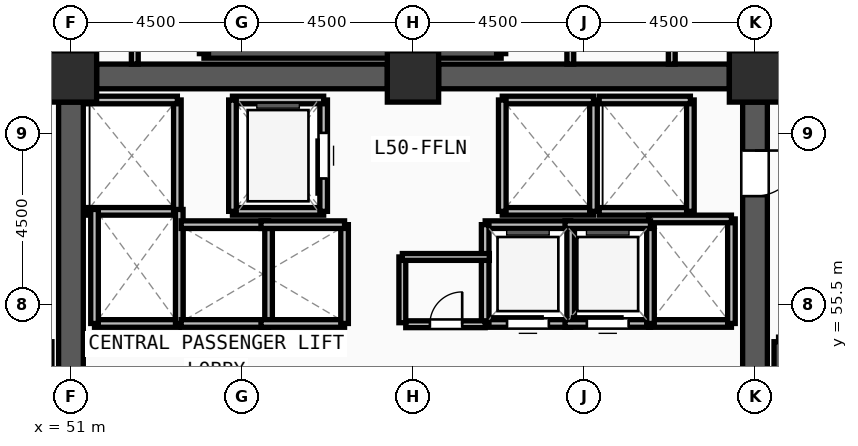
"""IFC4 building model, lengths in metres.
Left out: names, types, materials, properties, quantities, classifications, styles, units other than length and angle.
Written with IfcOpenShell. Run it as: python <this file> out.ifc"""

import sys

from ifc_helpers import new_model, si_unit, direction, frame, frame_2d, origin, origin_2d, place, context, subcontext, project, spatial, rectangle, extrude, source, transform, mapped, element, fill, save


model = new_model("IFC4")
c1 = context("Model", 3, precision=1e-05, world=origin(), true_north=direction((0.0, 1.0)))
c2 = subcontext(c1, "Body", "Model", "MODEL_VIEW")
j1 = project(units=[si_unit("LENGTHUNIT", "METRE"), si_unit("PLANEANGLEUNIT", "RADIAN")], contexts=[c1])
p1 = place(None, origin())
s1 = spatial("IfcSite", under=j1, at=p1, CompositionType="ELEMENT")
p2 = place(p1, origin())
s2 = spatial("IfcBuilding", under=s1, at=p2, CompositionType="ELEMENT")
p3 = place(p2, frame((0.0, 0.0, 194.25)))
s3 = spatial("IfcBuildingStorey", under=s2, at=p3, CompositionType="ELEMENT", Elevation=194.25)
m1 = source(origin(), c2, "Body", "SweptSolid", [
    extrude(rectangle(XDim=1.35, YDim=1.35, at=origin_2d()), origin(), (0.0, 0.0, 1.0), 3.75),
])
for number, where, z_axis, x_axis in (
    (1, (69.0, 61.5, 0.0), (0.0, 0.0, 1.0), (1.0, 0.0, 0.0)),
    (2, (60.0, 61.5, 0.0), (0.0, 0.0, 1.0), (1.0, 0.0, 0.0)),
    (3, (51.0, 61.5, 0.0), (0.0, 0.0, 1.0), (1.0, 0.0, 0.0)),
):
    element("IfcColumn", number, at=place(p3, frame(where, z_axis=z_axis, x_axis=x_axis)), inside=s3, PredefinedType="COLUMN", context=c2, shape_type="MappedRepresentation", body=[
        mapped(m1, transform((0.0, 0.0, 0.0), x_axis=(1.0, 0.0, 0.0), y_axis=(0.0, 1.0, 0.0), z_axis=(0.0, 0.0, 1.0), scale=1.0)),
    ])
for number, where, z_axis, x_axis in (
    (4, (51.675, 61.5, 0.0), (0.0, 0.0, 1.0), (1.0, 0.0, 0.0)),
    (5, (60.675, 61.5, 0.0), (0.0, 0.0, 1.0), (1.0, 0.0, 0.0)),
):
    element("IfcWall", number, at=place(p3, frame(where, z_axis=z_axis, x_axis=x_axis)), inside=s3, PredefinedType="SHEAR", context=c2, shape_type="SweptSolid", body=[
        extrude(rectangle(XDim=7.65, YDim=0.65, at=frame_2d((3.825, 0.0))), origin(), (0.0, 0.0, 1.0), 3.57),
    ])
p4 = place(p3, frame((69.0, 60.825, 0.0), z_axis=(0.0, 0.0, 1.0), x_axis=(0.0, -1.0, 0.0)))
e6 = element("IfcWall", 6, at=p4, inside=s3, PredefinedType="SHEAR", context=c2, shape_type="SweptSolid", body=[
    extrude(rectangle(XDim=13.65, YDim=0.65, at=frame_2d((6.825, 0.0))), origin(), (0.0, 0.0, 1.0), 3.57),
])
m2 = source(origin(), c2, "Body", "SweptSolid", [
    extrude(rectangle(XDim=1.2, YDim=2.2, at=frame_2d((0.6, 1.1))), frame((0.0, 0.335, 0.0), z_axis=(0.0, -1.0, 0.0), x_axis=(1.0, 0.0, 0.0)), (0.0, 0.0, 1.0), 0.67),
])
p5 = place(p4, frame((1.275, 0.0, 0.0)))
e7 = element("IfcOpeningElement", 7, at=p5, cuts=e6, PredefinedType="OPENING", context=c2, shape_type="MappedRepresentation", body=[
    mapped(m2, transform((0.0, 0.0, 0.0), x_axis=(1.0, 0.0, 0.0), y_axis=(0.0, 1.0, 0.0), z_axis=(0.0, 0.0, 1.0), scale=1.0)),
])
p6 = place(p3, frame((51.0, 47.175, 0.0), z_axis=(0.0, 0.0, 1.0), x_axis=(0.0, 1.0, 0.0)))
e8 = element("IfcWall", 8, at=p6, inside=s3, PredefinedType="SHEAR", context=c2, shape_type="SweptSolid", body=[
    extrude(rectangle(XDim=13.65, YDim=0.65, at=frame_2d((6.825, 0.0))), origin(), (0.0, 0.0, 1.0), 3.57),
])
for number, where, z_axis, x_axis in (
    (9, (69.62, 54.52, 0.0), (0.0, 0.0, 1.0), (0.0, -1.0, 0.0)),
    (10, (54.5, 62.1, 0.0), (0.0, 0.0, 1.0), (1.0, 0.0, 0.0)),
):
    element("IfcWall", number, at=place(p3, frame(where, z_axis=z_axis, x_axis=x_axis)), inside=s3, PredefinedType="SOLIDWALL", context=c2, shape_type="SweptSolid", body=[
        extrude(rectangle(XDim=7.82, YDim=0.24, at=frame_2d((3.91, 0.0))), origin(), (0.0, 0.0, 1.0), 3.57),
    ])
for number, where, z_axis, x_axis in (
    (11, (62.32, 62.1, 0.0), (0.0, 0.0, 1.0), (0.0, 1.0, 0.0)),
    (12, (54.5, 65.54, 0.0), (0.0, 0.0, 1.0), (0.0, -1.0, 0.0)),
):
    element("IfcWall", number, at=place(p3, frame(where, z_axis=z_axis, x_axis=x_axis)), inside=s3, PredefinedType="SOLIDWALL", context=c2, shape_type="SweptSolid", body=[
        extrude(rectangle(XDim=3.44, YDim=0.24, at=frame_2d((1.72, 0.0))), origin(), (0.0, 0.0, 1.0), 3.57),
    ])
p7 = place(p3, frame((55.25, 57.95, 0.0), z_axis=(0.0, 0.0, 1.0), x_axis=(1.0, 0.0, 0.0)))
e13 = element("IfcWall", 13, at=p7, inside=s3, PredefinedType="SOLIDWALL", context=c2, shape_type="SweptSolid", body=[
    extrude(rectangle(XDim=2.4, YDim=0.2, at=frame_2d((1.2, 0.0))), origin(), (0.0, 0.0, 1.0), 3.57),
])
p8 = place(p3, frame((57.65, 57.95, 0.0), z_axis=(0.0, 0.0, 1.0), x_axis=(0.0, 1.0, 0.0)))
e14 = element("IfcWall", 14, at=p8, inside=s3, PredefinedType="SOLIDWALL", context=c2, shape_type="SweptSolid", body=[
    extrude(rectangle(XDim=2.93, YDim=0.2, at=frame_2d((1.465, 0.0))), origin(), (0.0, 0.0, 1.0), 3.57),
])
m3 = source(origin(), c2, "Body", "SweptSolid", [
    extrude(rectangle(XDim=1.2, YDim=2.3, at=frame_2d((0.6, 1.15))), frame((0.0, 0.11, 0.0), z_axis=(0.0, -1.0, 0.0), x_axis=(1.0, 0.0, 0.0)), (0.0, 0.0, 1.0), 0.22),
])
p9 = place(p8, frame((0.865, 0.0, 0.0)))
e15 = element("IfcOpeningElement", 15, at=p9, cuts=e14, PredefinedType="OPENING", context=c2, shape_type="MappedRepresentation", body=[
    mapped(m3, transform((0.0, 0.0, 0.0), x_axis=(1.0, 0.0, 0.0), y_axis=(0.0, 1.0, 0.0), z_axis=(0.0, 0.0, 1.0), scale=1.0)),
])
p10 = place(p3, frame((57.65, 60.88, 0.0), z_axis=(0.0, 0.0, 1.0), x_axis=(-1.0, 0.0, 0.0)))
e16 = element("IfcWall", 16, at=p10, inside=s3, PredefinedType="SOLIDWALL", context=c2, shape_type="SweptSolid", body=[
    extrude(rectangle(XDim=2.4, YDim=0.2, at=frame_2d((1.2, 0.0))), origin(), (0.0, 0.0, 1.0), 3.57),
])
p11 = place(p3, frame((55.25, 60.88, 0.0), z_axis=(0.0, 0.0, 1.0), x_axis=(0.0, -1.0, 0.0)))
e17 = element("IfcWall", 17, at=p11, inside=s3, PredefinedType="SOLIDWALL", context=c2, shape_type="SweptSolid", body=[
    extrude(rectangle(XDim=2.93, YDim=0.2, at=frame_2d((1.465, 0.0))), origin(), (0.0, 0.0, 1.0), 3.57),
])
p12 = place(p3, frame((62.35, 57.95, 0.0), z_axis=(0.0, 0.0, 1.0), x_axis=(1.0, 0.0, 0.0)))
e18 = element("IfcWall", 18, at=p12, inside=s3, PredefinedType="SOLIDWALL", context=c2, shape_type="SweptSolid", body=[
    extrude(rectangle(XDim=2.4, YDim=0.2, at=frame_2d((1.2, 0.0))), origin(), (0.0, 0.0, 1.0), 3.57),
])
p13 = place(p3, frame((64.75, 57.95, 0.0), z_axis=(0.0, 0.0, 1.0), x_axis=(0.0, 1.0, 0.0)))
e19 = element("IfcWall", 19, at=p13, inside=s3, PredefinedType="SOLIDWALL", context=c2, shape_type="SweptSolid", body=[
    extrude(rectangle(XDim=2.93, YDim=0.2, at=frame_2d((1.465, 0.0))), origin(), (0.0, 0.0, 1.0), 3.57),
])
p14 = place(p3, frame((64.75, 60.88, 0.0), z_axis=(0.0, 0.0, 1.0), x_axis=(-1.0, 0.0, 0.0)))
e20 = element("IfcWall", 20, at=p14, inside=s3, PredefinedType="SOLIDWALL", context=c2, shape_type="SweptSolid", body=[
    extrude(rectangle(XDim=2.4, YDim=0.2, at=frame_2d((1.2, 0.0))), origin(), (0.0, 0.0, 1.0), 3.57),
])
p15 = place(p3, frame((62.35, 60.88, 0.0), z_axis=(0.0, 0.0, 1.0), x_axis=(0.0, -1.0, 0.0)))
e21 = element("IfcWall", 21, at=p15, inside=s3, PredefinedType="SOLIDWALL", context=c2, shape_type="SweptSolid", body=[
    extrude(rectangle(XDim=2.93, YDim=0.2, at=frame_2d((1.465, 0.0))), origin(), (0.0, 0.0, 1.0), 3.57),
])
p16 = place(p3, frame((64.9, 57.95, 0.0), z_axis=(0.0, 0.0, 1.0), x_axis=(1.0, 0.0, 0.0)))
e22 = element("IfcWall", 22, at=p16, inside=s3, PredefinedType="SOLIDWALL", context=c2, shape_type="SweptSolid", body=[
    extrude(rectangle(XDim=2.4, YDim=0.2, at=frame_2d((1.2, 0.0))), origin(), (0.0, 0.0, 1.0), 3.57),
])
p17 = place(p3, frame((67.3, 57.95, 0.0), z_axis=(0.0, 0.0, 1.0), x_axis=(0.0, 1.0, 0.0)))
e23 = element("IfcWall", 23, at=p17, inside=s3, PredefinedType="SOLIDWALL", context=c2, shape_type="SweptSolid", body=[
    extrude(rectangle(XDim=2.93, YDim=0.2, at=frame_2d((1.465, 0.0))), origin(), (0.0, 0.0, 1.0), 3.57),
])
for number, where, z_axis, x_axis in (
    (24, (67.3, 60.88, 0.0), (0.0, 0.0, 1.0), (-1.0, 0.0, 0.0)),
    (25, (51.4, 57.95, 0.0), (0.0, 0.0, 1.0), (1.0, 0.0, 0.0)),
):
    element("IfcWall", number, at=place(p3, frame(where, z_axis=z_axis, x_axis=x_axis)), inside=s3, PredefinedType="SOLIDWALL", context=c2, shape_type="SweptSolid", body=[
        extrude(rectangle(XDim=2.4, YDim=0.2, at=frame_2d((1.2, 0.0))), origin(), (0.0, 0.0, 1.0), 3.57),
    ])
p18 = place(p3, frame((53.8, 57.95, 0.0), z_axis=(0.0, 0.0, 1.0), x_axis=(0.0, 1.0, 0.0)))
e26 = element("IfcWall", 26, at=p18, inside=s3, PredefinedType="SOLIDWALL", context=c2, shape_type="SweptSolid", body=[
    extrude(rectangle(XDim=2.93, YDim=0.2, at=frame_2d((1.465, 0.0))), origin(), (0.0, 0.0, 1.0), 3.57),
])
p19 = place(p3, frame((53.8, 60.88, 0.0), z_axis=(0.0, 0.0, 1.0), x_axis=(-1.0, 0.0, 0.0)))
e27 = element("IfcWall", 27, at=p19, inside=s3, PredefinedType="SOLIDWALL", context=c2, shape_type="SweptSolid", body=[
    extrude(rectangle(XDim=2.4, YDim=0.2, at=frame_2d((1.2, 0.0))), origin(), (0.0, 0.0, 1.0), 3.57),
])
p20 = place(p3, frame((51.62, 55.0, 0.0), z_axis=(0.0, 0.0, 1.0), x_axis=(1.0, 0.0, 0.0)))
e28 = element("IfcWall", 28, at=p20, inside=s3, PredefinedType="SOLIDWALL", context=c2, shape_type="SweptSolid", body=[
    extrude(rectangle(XDim=2.23, YDim=0.2, at=frame_2d((1.115, 0.0))), origin(), (0.0, 0.0, 1.0), 3.57),
])
for number, where, z_axis, x_axis in (
    (29, (53.85, 55.0, 0.0), (0.0, 0.0, 1.0), (0.0, 1.0, 0.0)),
    (30, (51.62, 58.0, 0.0), (0.0, 0.0, 1.0), (0.0, -1.0, 0.0)),
):
    element("IfcWall", number, at=place(p3, frame(where, z_axis=z_axis, x_axis=x_axis)), inside=s3, PredefinedType="SOLIDWALL", context=c2, shape_type="SweptSolid", body=[
        extrude(rectangle(XDim=3.0, YDim=0.2, at=frame_2d((1.5, 0.0))), origin(), (0.0, 0.0, 1.0), 3.57),
    ])
p21 = place(p3, frame((66.2, 55.0, 0.0), z_axis=(0.0, 0.0, 1.0), x_axis=(1.0, 0.0, 0.0)))
e31 = element("IfcWall", 31, at=p21, inside=s3, PredefinedType="SOLIDWALL", context=c2, shape_type="SweptSolid", body=[
    extrude(rectangle(XDim=2.18, YDim=0.2, at=frame_2d((1.09, 0.0))), origin(), (0.0, 0.0, 1.0), 3.57),
])
p22 = place(p3, frame((68.38, 55.0, 0.0), z_axis=(0.0, 0.0, 1.0), x_axis=(0.0, 1.0, 0.0)))
e32 = element("IfcWall", 32, at=p22, inside=s3, PredefinedType="SOLIDWALL", context=c2, shape_type="SweptSolid", body=[
    extrude(rectangle(XDim=2.75, YDim=0.2, at=frame_2d((1.375, 0.0))), origin(), (0.0, 0.0, 1.0), 3.57),
])
p23 = place(p3, frame((68.38, 57.75, 0.0), z_axis=(0.0, 0.0, 1.0), x_axis=(-1.0, 0.0, 0.0)))
e33 = element("IfcWall", 33, at=p23, inside=s3, PredefinedType="SOLIDWALL", context=c2, shape_type="SweptSolid", body=[
    extrude(rectangle(XDim=2.18, YDim=0.2, at=frame_2d((1.09, 0.0))), origin(), (0.0, 0.0, 1.0), 3.57),
])
p24 = place(p3, frame((53.9, 55.0, 0.0), z_axis=(0.0, 0.0, 1.0), x_axis=(1.0, 0.0, 0.0)))
e34 = element("IfcWall", 34, at=p24, inside=s3, PredefinedType="SOLIDWALL", context=c2, shape_type="SweptSolid", body=[
    extrude(rectangle(XDim=2.3, YDim=0.2, at=frame_2d((1.15, 0.0))), origin(), (0.0, 0.0, 1.0), 3.57),
])
p25 = place(p3, frame((56.2, 55.0, 0.0), z_axis=(0.0, 0.0, 1.0), x_axis=(0.0, 1.0, 0.0)))
e35 = element("IfcWall", 35, at=p25, inside=s3, PredefinedType="SOLIDWALL", context=c2, shape_type="SweptSolid", body=[
    extrude(rectangle(XDim=2.6, YDim=0.2, at=frame_2d((1.3, 0.0))), origin(), (0.0, 0.0, 1.0), 3.57),
])
p26 = place(p3, frame((56.2, 57.6, 0.0), z_axis=(0.0, 0.0, 1.0), x_axis=(-1.0, 0.0, 0.0)))
e36 = element("IfcWall", 36, at=p26, inside=s3, PredefinedType="SOLIDWALL", context=c2, shape_type="SweptSolid", body=[
    extrude(rectangle(XDim=2.3, YDim=0.2, at=frame_2d((1.15, 0.0))), origin(), (0.0, 0.0, 1.0), 3.57),
])
p27 = place(p3, frame((56.0, 55.0, 0.0), z_axis=(0.0, 0.0, 1.0), x_axis=(1.0, 0.0, 0.0)))
e37 = element("IfcWall", 37, at=p27, inside=s3, PredefinedType="SOLIDWALL", context=c2, shape_type="SweptSolid", body=[
    extrude(rectangle(XDim=2.2, YDim=0.2, at=frame_2d((1.1, 0.0))), origin(), (0.0, 0.0, 1.0), 3.57),
])
p28 = place(p3, frame((58.2, 55.0, 0.0), z_axis=(0.0, 0.0, 1.0), x_axis=(0.0, 1.0, 0.0)))
e38 = element("IfcWall", 38, at=p28, inside=s3, PredefinedType="SOLIDWALL", context=c2, shape_type="SweptSolid", body=[
    extrude(rectangle(XDim=2.6, YDim=0.2, at=frame_2d((1.3, 0.0))), origin(), (0.0, 0.0, 1.0), 3.57),
])
p29 = place(p3, frame((58.2, 57.6, 0.0), z_axis=(0.0, 0.0, 1.0), x_axis=(-1.0, 0.0, 0.0)))
e39 = element("IfcWall", 39, at=p29, inside=s3, PredefinedType="SOLIDWALL", context=c2, shape_type="SweptSolid", body=[
    extrude(rectangle(XDim=2.2, YDim=0.2, at=frame_2d((1.1, 0.0))), origin(), (0.0, 0.0, 1.0), 3.57),
])
p30 = place(p3, frame((61.9, 55.0, 0.0), z_axis=(0.0, 0.0, 1.0), x_axis=(1.0, 0.0, 0.0)))
e40 = element("IfcWall", 40, at=p30, inside=s3, PredefinedType="SOLIDWALL", context=c2, shape_type="SweptSolid", body=[
    extrude(rectangle(XDim=2.25, YDim=0.2, at=frame_2d((1.125, 0.0))), origin(), (0.0, 0.0, 1.0), 3.57),
])
m4 = source(origin(), c2, "Body", "SweptSolid", [
    extrude(rectangle(XDim=1.1, YDim=2.2, at=frame_2d((0.55, 1.1))), frame((0.0, 0.11, 0.0), z_axis=(0.0, -1.0, 0.0), x_axis=(1.0, 0.0, 0.0)), (0.0, 0.0, 1.0), 0.22),
])
p31 = place(p30, frame((0.575, 0.0, 0.0)))
e41 = element("IfcOpeningElement", 41, at=p31, cuts=e40, PredefinedType="OPENING", context=c2, shape_type="MappedRepresentation", body=[
    mapped(m4, transform((0.0, 0.0, 0.0), x_axis=(1.0, 0.0, 0.0), y_axis=(0.0, 1.0, 0.0), z_axis=(0.0, 0.0, 1.0), scale=1.0)),
])
p32 = place(p3, frame((64.15, 55.0, 0.0), z_axis=(0.0, 0.0, 1.0), x_axis=(0.0, 1.0, 0.0)))
e42 = element("IfcWall", 42, at=p32, inside=s3, PredefinedType="SOLIDWALL", context=c2, shape_type="SweptSolid", body=[
    extrude(rectangle(XDim=2.6, YDim=0.2, at=frame_2d((1.3, 0.0))), origin(), (0.0, 0.0, 1.0), 3.57),
])
p33 = place(p3, frame((64.15, 57.6, 0.0), z_axis=(0.0, 0.0, 1.0), x_axis=(-1.0, 0.0, 0.0)))
e43 = element("IfcWall", 43, at=p33, inside=s3, PredefinedType="SOLIDWALL", context=c2, shape_type="SweptSolid", body=[
    extrude(rectangle(XDim=2.25, YDim=0.2, at=frame_2d((1.125, 0.0))), origin(), (0.0, 0.0, 1.0), 3.57),
])
p34 = place(p3, frame((61.9, 57.6, 0.0), z_axis=(0.0, 0.0, 1.0), x_axis=(0.0, -1.0, 0.0)))
e44 = element("IfcWall", 44, at=p34, inside=s3, PredefinedType="SOLIDWALL", context=c2, shape_type="SweptSolid", body=[
    extrude(rectangle(XDim=2.6, YDim=0.2, at=frame_2d((1.3, 0.0))), origin(), (0.0, 0.0, 1.0), 3.57),
])
p35 = place(p3, frame((64.0, 55.0, 0.0), z_axis=(0.0, 0.0, 1.0), x_axis=(1.0, 0.0, 0.0)))
e45 = element("IfcWall", 45, at=p35, inside=s3, PredefinedType="SOLIDWALL", context=c2, shape_type="SweptSolid", body=[
    extrude(rectangle(XDim=2.25, YDim=0.2, at=frame_2d((1.125, 0.0))), origin(), (0.0, 0.0, 1.0), 3.57),
])
p36 = place(p35, frame((0.575, 0.0, 0.0)))
e46 = element("IfcOpeningElement", 46, at=p36, cuts=e45, PredefinedType="OPENING", context=c2, shape_type="MappedRepresentation", body=[
    mapped(m4, transform((0.0, 0.0, 0.0), x_axis=(1.0, 0.0, 0.0), y_axis=(0.0, 1.0, 0.0), z_axis=(0.0, 0.0, 1.0), scale=1.0)),
])
p37 = place(p3, frame((66.25, 55.0, 0.0), z_axis=(0.0, 0.0, 1.0), x_axis=(0.0, 1.0, 0.0)))
e47 = element("IfcWall", 47, at=p37, inside=s3, PredefinedType="SOLIDWALL", context=c2, shape_type="SweptSolid", body=[
    extrude(rectangle(XDim=2.6, YDim=0.2, at=frame_2d((1.3, 0.0))), origin(), (0.0, 0.0, 1.0), 3.57),
])
p38 = place(p3, frame((66.25, 57.6, 0.0), z_axis=(0.0, 0.0, 1.0), x_axis=(-1.0, 0.0, 0.0)))
e48 = element("IfcWall", 48, at=p38, inside=s3, PredefinedType="SOLIDWALL", context=c2, shape_type="SweptSolid", body=[
    extrude(rectangle(XDim=2.25, YDim=0.2, at=frame_2d((1.125, 0.0))), origin(), (0.0, 0.0, 1.0), 3.57),
])
p39 = place(p3, frame((59.81, 54.98, 0.0), z_axis=(0.0, 0.0, 1.0), x_axis=(1.0, 0.0, 0.0)))
e49 = element("IfcWall", 49, at=p39, inside=s3, PredefinedType="PARTITIONING", context=c2, shape_type="SweptSolid", body=[
    extrude(rectangle(XDim=2.09, YDim=0.18, at=frame_2d((1.045, 0.0))), origin(), (0.0, 0.0, 1.0), 3.57),
])
m5 = source(origin(), c2, "Body", "SweptSolid", [
    extrude(rectangle(XDim=0.85, YDim=2.1, at=frame_2d((0.425, 1.05))), frame((0.0, 0.1, 0.0), z_axis=(0.0, -1.0, 0.0), x_axis=(1.0, 0.0, 0.0)), (0.0, 0.0, 1.0), 0.2),
])
p40 = place(p39, frame((0.635, 0.0, 0.0)))
e50 = element("IfcOpeningElement", 50, at=p40, cuts=e49, PredefinedType="OPENING", context=c2, shape_type="MappedRepresentation", body=[
    mapped(m5, transform((0.0, 0.0, 0.0), x_axis=(1.0, 0.0, 0.0), y_axis=(0.0, 1.0, 0.0), z_axis=(0.0, 0.0, 1.0), scale=1.0)),
])
p41 = place(p3, frame((59.72, 55.02, 0.0), z_axis=(0.0, 0.0, 1.0), x_axis=(0.0, 1.0, 0.0)))
e51 = element("IfcWall", 51, at=p41, inside=s3, PredefinedType="PARTITIONING", context=c2, shape_type="SweptSolid", body=[
    extrude(rectangle(XDim=1.73, YDim=0.18, at=frame_2d((0.865, 0.0))), origin(), (0.0, 0.0, 1.0), 3.57),
])
p42 = place(p3, frame((59.72, 56.75, 0.0), z_axis=(0.0, 0.0, 1.0), x_axis=(1.0, 0.0, 0.0)))
e52 = element("IfcWall", 52, at=p42, inside=s3, PredefinedType="PARTITIONING", context=c2, shape_type="SweptSolid", body=[
    extrude(rectangle(XDim=2.29, YDim=0.18, at=frame_2d((1.145, 0.0))), origin(), (0.0, 0.0, 1.0), 3.57),
])
p43 = place(p3, frame((50.54, 61.95, 0.0), z_axis=(0.0, 0.0, 1.0), x_axis=(0.0, 1.0, 0.0)))
e53 = element("IfcWall", 53, at=p43, inside=s3, PredefinedType="PARTITIONING", context=c2, shape_type="SweptSolid", body=[
    extrude(rectangle(XDim=3.63, YDim=0.18, at=frame_2d((1.815, 0.0))), origin(), (0.0, 0.0, 1.0), 3.57),
])
for number, where, z_axis, x_axis in (
    (54, (52.68, 61.825, 0.0), (0.0, 0.0, 1.0), (0.0, 1.0, 0.0)),
    (55, (64.14, 61.825, 0.0), (0.0, 0.0, 1.0), (0.0, 1.0, 0.0)),
    (56, (66.81, 61.825, 0.0), (0.0, 0.0, 1.0), (0.0, 1.0, 0.0)),
):
    element("IfcWall", number, at=place(p3, frame(where, z_axis=z_axis, x_axis=x_axis)), inside=s3, PredefinedType="PARTITIONING", context=c2, shape_type="SweptSolid", body=[
        extrude(rectangle(XDim=3.755, YDim=0.18, at=frame_2d((1.877, 0.0))), origin(), (0.0, 0.0, 1.0), 3.57),
    ])
m6 = source(origin(), c2, "Body", "SweptSolid", [
    extrude(rectangle(XDim=1.2, YDim=2.2, at=frame_2d((0.6, 1.1))), frame((0.0, 0.025, 0.0), z_axis=(0.0, -1.0, 0.0), x_axis=(1.0, 0.0, 0.0)), (0.0, 0.0, 1.0), 0.05),
])
p44 = place(p5, origin())
e57 = element("IfcDoor", 57, at=p44, inside=s3, OperationType="SINGLE_SWING_LEFT", PredefinedType="DOOR", context=c2, shape_type="MappedRepresentation", body=[
    mapped(m6, transform((0.0, 0.0, 0.0), x_axis=(1.0, 0.0, 0.0), y_axis=(0.0, 1.0, 0.0), z_axis=(0.0, 0.0, 1.0), scale=1.0)),
])
fill(e7, e57)
m7 = source(origin(), c2, "Body", "SweptSolid", [
    extrude(rectangle(XDim=1.2, YDim=2.3, at=frame_2d((0.6, 1.15))), frame((0.0, 0.025, 0.0), z_axis=(0.0, -1.0, 0.0), x_axis=(1.0, 0.0, 0.0)), (0.0, 0.0, 1.0), 0.05),
])
p45 = place(p9, origin())
e58 = element("IfcDoor", 58, at=p45, inside=s3, OperationType="SLIDING_TO_LEFT", PredefinedType="DOOR", context=c2, shape_type="MappedRepresentation", body=[
    mapped(m7, transform((0.0, 0.0, 0.0), x_axis=(1.0, 0.0, 0.0), y_axis=(0.0, 1.0, 0.0), z_axis=(0.0, 0.0, 1.0), scale=1.0)),
])
fill(e15, e58)
m8 = source(origin(), c2, "Body", "SweptSolid", [
    extrude(rectangle(XDim=1.1, YDim=2.2, at=frame_2d((0.55, 1.1))), frame((0.0, 0.025, 0.0), z_axis=(0.0, -1.0, 0.0), x_axis=(1.0, 0.0, 0.0)), (0.0, 0.0, 1.0), 0.05),
])
p46 = place(p31, origin())
e59 = element("IfcDoor", 59, at=p46, inside=s3, OperationType="SLIDING_TO_LEFT", PredefinedType="DOOR", context=c2, shape_type="MappedRepresentation", body=[
    mapped(m8, transform((0.0, 0.0, 0.0), x_axis=(1.0, 0.0, 0.0), y_axis=(0.0, 1.0, 0.0), z_axis=(0.0, 0.0, 1.0), scale=1.0)),
])
fill(e41, e59)
p47 = place(p36, origin())
e60 = element("IfcDoor", 60, at=p47, inside=s3, OperationType="SLIDING_TO_LEFT", PredefinedType="DOOR", context=c2, shape_type="MappedRepresentation", body=[
    mapped(m8, transform((0.0, 0.0, 0.0), x_axis=(1.0, 0.0, 0.0), y_axis=(0.0, 1.0, 0.0), z_axis=(0.0, 0.0, 1.0), scale=1.0)),
])
fill(e46, e60)
m9 = source(origin(), c2, "Body", "SweptSolid", [
    extrude(rectangle(XDim=0.85, YDim=2.1, at=frame_2d((0.425, 1.05))), frame((0.0, 0.025, 0.0), z_axis=(0.0, -1.0, 0.0), x_axis=(1.0, 0.0, 0.0)), (0.0, 0.0, 1.0), 0.05),
])
p48 = place(p40, origin())
e61 = element("IfcDoor", 61, at=p48, inside=s3, OperationType="SINGLE_SWING_RIGHT", PredefinedType="DOOR", context=c2, shape_type="MappedRepresentation", body=[
    mapped(m9, transform((0.0, 0.0, 0.0), x_axis=(1.0, 0.0, 0.0), y_axis=(0.0, 1.0, 0.0), z_axis=(0.0, 0.0, 1.0), scale=1.0)),
])
fill(e50, e61)
save(model, sys.argv[1])
